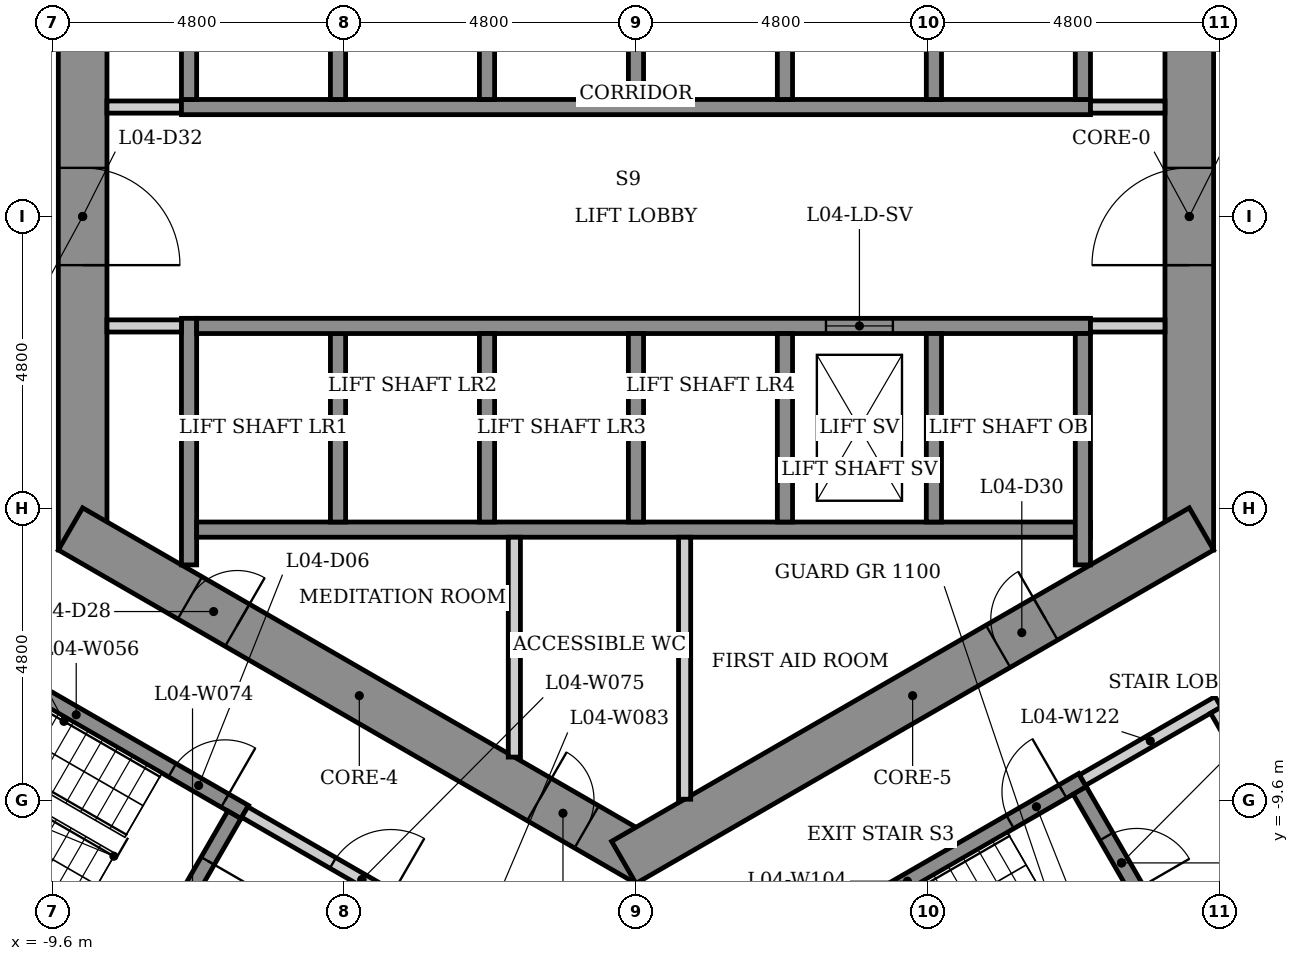
"""IFC4 building model, lengths in metres.
Left out: names, types, materials, properties, quantities, classifications, styles, units other than length and angle.
Written with IfcOpenShell. Run it as: python <this file> out.ifc"""

import sys

from ifc_helpers import new_model, si_unit, direction, frame, frame_2d, origin, place, context, subcontext, project, spatial, rectangle, extrude, element, fill, save


model = new_model("IFC4")
c1 = context("Model", 3, precision=1e-05, world=origin(), true_north=direction((0.0, 1.0)))
c2 = subcontext(c1, "Body", "Model", "MODEL_VIEW")
j1 = project(units=[si_unit("LENGTHUNIT", "METRE"), si_unit("PLANEANGLEUNIT", "RADIAN")], contexts=[c1])
p1 = place(None, origin())
s1 = spatial("IfcSite", under=j1, at=p1, CompositionType="ELEMENT")
p2 = place(p1, origin())
s2 = spatial("IfcBuilding", under=s1, at=p2, CompositionType="ELEMENT")
p3 = place(p2, frame((0.0, 0.0, 20.5)))
s3 = spatial("IfcBuildingStorey", under=s2, at=p3, CompositionType="ELEMENT", Elevation=20.5)
p4 = place(p3, frame((9.1, -5.485, 0.0), z_axis=(0.0, 0.0, 1.0), x_axis=(0.0, 1.0, 0.0)))
e1 = element("IfcWall", 1, at=p4, inside=s3, PredefinedType="SHEAR", context=c2, shape_type="SweptSolid", body=[
    extrude(rectangle(XDim=10.97, YDim=0.8, at=frame_2d((5.485, 0.0))), origin(), (0.0, 0.0, 1.0), 5.0),
])
p5 = place(p4, frame((4.685, 0.0, 0.0)))
e2 = element("IfcOpeningElement", 2, at=p5, cuts=e1, PredefinedType="OPENING", context=c2, shape_type="SweptSolid", body=[
    extrude(rectangle(XDim=1.6, YDim=2.1, at=frame_2d((0.8, 1.05))), frame((0.0, 0.41, 0.0), z_axis=(0.0, -1.0, 0.0), x_axis=(1.0, 0.0, 0.0)), (0.0, 0.0, 1.0), 0.82),
])
p6 = place(p3, frame((-9.1, 5.485, 0.0), z_axis=(0.0, 0.0, 1.0), x_axis=(0.0, -1.0, 0.0)))
e3 = element("IfcWall", 3, at=p6, inside=s3, PredefinedType="SHEAR", context=c2, shape_type="SweptSolid", body=[
    extrude(rectangle(XDim=10.97, YDim=0.8, at=frame_2d((5.485, 0.0))), origin(), (0.0, 0.0, 1.0), 5.0),
])
p7 = place(p6, frame((4.685, 0.0, 0.0)))
e4 = element("IfcOpeningElement", 4, at=p7, cuts=e3, PredefinedType="OPENING", context=c2, shape_type="SweptSolid", body=[
    extrude(rectangle(XDim=1.6, YDim=2.1, at=frame_2d((0.8, 1.05))), frame((0.0, 0.41, 0.0), z_axis=(0.0, -1.0, 0.0), x_axis=(1.0, 0.0, 0.0)), (0.0, 0.0, 1.0), 0.82),
])
p8 = place(p3, frame((-9.3, -5.138, 0.0), z_axis=(0.0, 0.0, 1.0), x_axis=(0.866023993627, -0.500002442456, 0.0)))
e5 = element("IfcWall", 5, at=p8, inside=s3, PredefinedType="SHEAR", context=c2, shape_type="SweptSolid", body=[
    extrude(rectangle(XDim=10.97, YDim=0.8, at=frame_2d((5.485, 0.0))), origin(), (0.0, 0.0, 1.0), 5.0),
])
p9 = place(p8, frame((2.268, 0.0, 0.0)))
e6 = element("IfcOpeningElement", 6, at=p9, cuts=e5, PredefinedType="OPENING", context=c2, shape_type="SweptSolid", body=[
    extrude(rectangle(XDim=0.9, YDim=2.1, at=frame_2d((0.45, 1.05))), frame((0.0, 0.41, 0.0), z_axis=(0.0, -1.0, 0.0), x_axis=(1.0, 0.0, 0.0)), (0.0, 0.0, 1.0), 0.82),
])
p10 = place(p8, frame((8.903, 0.0, 0.0)))
e7 = element("IfcOpeningElement", 7, at=p10, cuts=e5, PredefinedType="OPENING", context=c2, shape_type="SweptSolid", body=[
    extrude(rectangle(XDim=0.9, YDim=2.1, at=frame_2d((0.45, 1.05))), frame((0.0, 0.41, 0.0), z_axis=(0.0, -1.0, 0.0), x_axis=(1.0, 0.0, 0.0)), (0.0, 0.0, 1.0), 0.82),
])
p11 = place(p3, frame((-0.2, -10.623, 0.0), z_axis=(0.0, 0.0, 1.0), x_axis=(0.866023993627, 0.500002442456, 0.0)))
e8 = element("IfcWall", 8, at=p11, inside=s3, PredefinedType="SHEAR", context=c2, shape_type="SweptSolid", body=[
    extrude(rectangle(XDim=10.97, YDim=0.8, at=frame_2d((5.485, 0.0))), origin(), (0.0, 0.0, 1.0), 5.0),
])
p12 = place(p11, frame((7.108, 0.0, 0.0)))
e9 = element("IfcOpeningElement", 9, at=p12, cuts=e8, PredefinedType="OPENING", context=c2, shape_type="SweptSolid", body=[
    extrude(rectangle(XDim=0.9, YDim=2.1, at=frame_2d((0.45, 1.05))), frame((0.0, 0.41, 0.0), z_axis=(0.0, -1.0, 0.0), x_axis=(1.0, 0.0, 0.0)), (0.0, 0.0, 1.0), 0.82),
])
p13 = place(p3, frame((-11.977, -6.595, 0.0), z_axis=(0.0, 0.0, 1.0), x_axis=(0.866025499775, -0.499999833739, 0.0)))
e10 = element("IfcWall", 10, at=p13, inside=s3, PredefinedType="SHEAR", context=c2, shape_type="SweptSolid", body=[
    extrude(rectangle(XDim=6.4, YDim=0.25, at=frame_2d((3.2, 0.0))), origin(), (0.0, 0.0, 1.0), 4.65),
])
p14 = place(p13, frame((5.025, 0.0, 0.0)))
e11 = element("IfcOpeningElement", 11, at=p14, cuts=e10, PredefinedType="OPENING", context=c2, shape_type="SweptSolid", body=[
    extrude(rectangle(XDim=1.0, YDim=2.1, at=frame_2d((0.5, 1.05))), frame((0.0, 0.135, 0.0), z_axis=(0.0, -1.0, 0.0), x_axis=(1.0, 0.0, 0.0)), (0.0, 0.0, 1.0), 0.27),
])
p15 = place(p3, frame((-8.7, 1.8, 0.0), z_axis=(0.0, 0.0, 1.0), x_axis=(1.0, 0.0, 0.0)))
e12 = element("IfcWall", 12, at=p15, inside=s3, PredefinedType="PARTITIONING", context=c2, shape_type="SweptSolid", body=[
    extrude(rectangle(XDim=1.225, YDim=0.2, at=frame_2d((0.613, 0.0))), origin(), (0.0, 0.0, 1.0), 4.65),
])
p16 = place(p3, frame((-7.935, -12.393, 0.0), z_axis=(0.0, 0.0, 1.0), x_axis=(-0.866025499775, 0.499999833739, 0.0)))
e13 = element("IfcWall", 13, at=p16, inside=s3, PredefinedType="SHEAR", context=c2, shape_type="SweptSolid", body=[
    extrude(rectangle(XDim=6.4, YDim=0.25, at=frame_2d((3.2, 0.0))), origin(), (0.0, 0.0, 1.0), 4.65),
])
p17 = place(p3, frame((-7.475, 1.8, 0.0), z_axis=(0.0, 0.0, 1.0), x_axis=(1.0, 0.0, 0.0)))
e14 = element("IfcWall", 14, at=p17, inside=s3, PredefinedType="SHEAR", context=c2, shape_type="SweptSolid", body=[
    extrude(rectangle(XDim=14.95, YDim=0.25, at=frame_2d((7.475, 0.0))), origin(), (0.0, 0.0, 1.0), 4.65),
])
p18 = place(p3, frame((-7.35, -5.73, 0.0), z_axis=(0.0, 0.0, 1.0), x_axis=(0.0, 1.0, 0.0)))
e15 = element("IfcWall", 15, at=p18, inside=s3, PredefinedType="SHEAR", context=c2, shape_type="SweptSolid", body=[
    extrude(rectangle(XDim=4.055, YDim=0.25, at=frame_2d((2.028, 0.0))), origin(), (0.0, 0.0, 1.0), 4.65),
])
p19 = place(p3, frame((-7.35, 1.925, 0.0), z_axis=(0.0, 0.0, 1.0), x_axis=(0.0, 1.0, 0.0)))
e16 = element("IfcWall", 16, at=p19, inside=s3, PredefinedType="SHEAR", context=c2, shape_type="SweptSolid", body=[
    extrude(rectangle(XDim=3.805, YDim=0.25, at=frame_2d((1.903, 0.0))), origin(), (0.0, 0.0, 1.0), 4.65),
])
p20 = place(p3, frame((-7.475, -1.8, 0.0), z_axis=(0.0, 0.0, 1.0), x_axis=(-1.0, 0.0, 0.0)))
e17 = element("IfcWall", 17, at=p20, inside=s3, PredefinedType="PARTITIONING", context=c2, shape_type="SweptSolid", body=[
    extrude(rectangle(XDim=1.225, YDim=0.2, at=frame_2d((0.613, 0.0))), origin(), (0.0, 0.0, 1.0), 4.65),
])
p21 = place(p3, frame((-6.605, -9.841, 0.0), z_axis=(0.0, 0.0, 1.0), x_axis=(-0.499996545922, -0.866027397988, 0.0)))
e18 = element("IfcWall", 18, at=p21, inside=s3, PredefinedType="SHEAR", context=c2, shape_type="SweptSolid", body=[
    extrude(rectangle(XDim=2.75, YDim=0.25, at=frame_2d((1.375, 0.0))), origin(), (0.0, 0.0, 1.0), 4.65),
])
p22 = place(p21, frame((0.875, 0.0, 0.0)))
e19 = element("IfcOpeningElement", 19, at=p22, cuts=e18, PredefinedType="OPENING", context=c2, shape_type="SweptSolid", body=[
    extrude(rectangle(XDim=1.0, YDim=2.1, at=frame_2d((0.5, 1.05))), frame((0.0, 0.135, 0.0), z_axis=(0.0, -1.0, 0.0), x_axis=(1.0, 0.0, 0.0)), (0.0, 0.0, 1.0), 0.27),
])
p23 = place(p3, frame((-6.435, -9.795, 0.0), z_axis=(0.0, 0.0, 1.0), x_axis=(0.866012907634, -0.500021643343, 0.0)))
e20 = element("IfcWall", 20, at=p23, inside=s3, PredefinedType="PARTITIONING", context=c2, shape_type="SweptSolid", body=[
    extrude(rectangle(XDim=4.45, YDim=0.2, at=frame_2d((2.225, 0.0))), origin(), (0.0, 0.0, 1.0), 4.65),
])
p24 = place(p23, frame((1.675, 0.0, 0.0)))
e21 = element("IfcOpeningElement", 21, at=p24, cuts=e20, PredefinedType="OPENING", context=c2, shape_type="SweptSolid", body=[
    extrude(rectangle(XDim=1.1, YDim=2.1, at=frame_2d((0.55, 1.05))), frame((0.0, 0.11, 0.0), z_axis=(0.0, -1.0, 0.0), x_axis=(1.0, 0.0, 0.0)), (0.0, 0.0, 1.0), 0.22),
])
p25 = place(p3, frame((-7.225, -5.15, 0.0), z_axis=(0.0, 0.0, 1.0), x_axis=(1.0, 0.0, 0.0)))
e22 = element("IfcWall", 22, at=p25, inside=s3, PredefinedType="SHEAR", context=c2, shape_type="SweptSolid", body=[
    extrude(rectangle(XDim=14.7, YDim=0.25, at=frame_2d((7.35, 0.0))), origin(), (0.0, 0.0, 1.0), 4.65),
])
for number, where, z_axis, x_axis in (
    (23, (-4.9, -1.925, 0.0), (0.0, 0.0, 1.0), (0.0, -1.0, 0.0)),
    (24, (-4.9, 5.025, 0.0), (0.0, 0.0, 1.0), (0.0, -1.0, 0.0)),
):
    element("IfcWall", number, at=place(p3, frame(where, z_axis=z_axis, x_axis=x_axis)), inside=s3, PredefinedType="SHEAR", context=c2, shape_type="SweptSolid", body=[
        extrude(rectangle(XDim=3.1, YDim=0.25, at=frame_2d((1.55, 0.0))), origin(), (0.0, 0.0, 1.0), 5.0),
    ])
p26 = place(p3, frame((-7.225, -1.8, 0.0), z_axis=(0.0, 0.0, 1.0), x_axis=(1.0, 0.0, 0.0)))
e25 = element("IfcWall", 25, at=p26, inside=s3, PredefinedType="SHEAR", context=c2, shape_type="SweptSolid", body=[
    extrude(rectangle(XDim=14.7, YDim=0.25, at=frame_2d((7.35, 0.0))), origin(), (0.0, 0.0, 1.0), 4.65),
])
p27 = place(p26, frame((10.35, 0.0, 0.0)))
e26 = element("IfcOpeningElement", 26, at=p27, cuts=e25, PredefinedType="OPENING", context=c2, shape_type="SweptSolid", body=[
    extrude(rectangle(XDim=1.1, YDim=2.1, at=frame_2d((0.55, 1.05))), frame((0.0, 0.135, 0.0), z_axis=(0.0, -1.0, 0.0), x_axis=(1.0, 0.0, 0.0)), (0.0, 0.0, 1.0), 0.27),
])
for number, where, z_axis, x_axis in (
    (27, (-2.45, -1.925, 0.0), (0.0, 0.0, 1.0), (0.0, -1.0, 0.0)),
    (28, (-2.45, 5.025, 0.0), (0.0, 0.0, 1.0), (0.0, -1.0, 0.0)),
):
    element("IfcWall", number, at=place(p3, frame(where, z_axis=z_axis, x_axis=x_axis)), inside=s3, PredefinedType="SHEAR", context=c2, shape_type="SweptSolid", body=[
        extrude(rectangle(XDim=3.1, YDim=0.25, at=frame_2d((1.55, 0.0))), origin(), (0.0, 0.0, 1.0), 5.0),
    ])
p28 = place(p3, frame((-2.0, -5.275, 0.0), z_axis=(0.0, 0.0, 1.0), x_axis=(0.0, -1.0, 0.0)))
e29 = element("IfcWall", 29, at=p28, inside=s3, PredefinedType="PARTITIONING", context=c2, shape_type="SweptSolid", body=[
    extrude(rectangle(XDim=3.616, YDim=0.2, at=frame_2d((1.808, 0.0))), origin(), (0.0, 0.0, 1.0), 4.65),
])
for number, where, z_axis, x_axis in (
    (30, (0.0, -1.925, 0.0), (0.0, 0.0, 1.0), (0.0, -1.0, 0.0)),
    (31, (0.0, 5.025, 0.0), (0.0, 0.0, 1.0), (0.0, -1.0, 0.0)),
):
    element("IfcWall", number, at=place(p3, frame(where, z_axis=z_axis, x_axis=x_axis)), inside=s3, PredefinedType="SHEAR", context=c2, shape_type="SweptSolid", body=[
        extrude(rectangle(XDim=3.1, YDim=0.25, at=frame_2d((1.55, 0.0))), origin(), (0.0, 0.0, 1.0), 5.0),
    ])
p29 = place(p3, frame((0.8, -5.275, 0.0), z_axis=(0.0, 0.0, 1.0), x_axis=(0.0, -1.0, 0.0)))
e32 = element("IfcWall", 32, at=p29, inside=s3, PredefinedType="PARTITIONING", context=c2, shape_type="SweptSolid", body=[
    extrude(rectangle(XDim=4.309, YDim=0.2, at=frame_2d((2.155, 0.0))), origin(), (0.0, 0.0, 1.0), 4.65),
])
p30 = place(p3, frame((1.585, -12.595, 0.0), z_axis=(0.0, 0.0, 1.0), x_axis=(0.866036417653, 0.499980922934, 0.0)))
e33 = element("IfcWall", 33, at=p30, inside=s3, PredefinedType="SHEAR", context=c2, shape_type="SweptSolid", body=[
    extrude(rectangle(XDim=6.65, YDim=0.25, at=frame_2d((3.325, 0.0))), origin(), (0.0, 0.0, 1.0), 4.65),
])
p31 = place(p30, frame((5.275, 0.0, 0.0)))
e34 = element("IfcOpeningElement", 34, at=p31, cuts=e33, PredefinedType="OPENING", context=c2, shape_type="SweptSolid", body=[
    extrude(rectangle(XDim=1.0, YDim=2.1, at=frame_2d((0.5, 1.05))), frame((0.0, 0.135, 0.0), z_axis=(0.0, -1.0, 0.0), x_axis=(1.0, 0.0, 0.0)), (0.0, 0.0, 1.0), 0.27),
])
for number, where, z_axis, x_axis in (
    (35, (2.45, -1.925, 0.0), (0.0, 0.0, 1.0), (0.0, -1.0, 0.0)),
    (36, (2.45, 5.025, 0.0), (0.0, 0.0, 1.0), (0.0, -1.0, 0.0)),
    (37, (4.9, -1.925, 0.0), (0.0, 0.0, 1.0), (0.0, -1.0, 0.0)),
    (38, (4.9, 5.025, 0.0), (0.0, 0.0, 1.0), (0.0, -1.0, 0.0)),
):
    element("IfcWall", number, at=place(p3, frame(where, z_axis=z_axis, x_axis=x_axis)), inside=s3, PredefinedType="SHEAR", context=c2, shape_type="SweptSolid", body=[
        extrude(rectangle(XDim=3.1, YDim=0.25, at=frame_2d((1.55, 0.0))), origin(), (0.0, 0.0, 1.0), 5.0),
    ])
p32 = place(p3, frame((7.298, -9.441, 0.0), z_axis=(0.0, 0.0, 1.0), x_axis=(0.500034990121, -0.866005201286, 0.0)))
e39 = element("IfcWall", 39, at=p32, inside=s3, PredefinedType="SHEAR", context=c2, shape_type="SweptSolid", body=[
    extrude(rectangle(XDim=2.75, YDim=0.25, at=frame_2d((1.375, 0.0))), origin(), (0.0, 0.0, 1.0), 4.65),
])
p33 = place(p32, frame((0.875, 0.0, 0.0)))
e40 = element("IfcOpeningElement", 40, at=p33, cuts=e39, PredefinedType="OPENING", context=c2, shape_type="SweptSolid", body=[
    extrude(rectangle(XDim=1.0, YDim=2.1, at=frame_2d((0.5, 1.05))), frame((0.0, 0.135, 0.0), z_axis=(0.0, -1.0, 0.0), x_axis=(1.0, 0.0, 0.0)), (0.0, 0.0, 1.0), 0.27),
])
p34 = place(p3, frame((7.344, -9.27, 0.0), z_axis=(0.0, 0.0, 1.0), x_axis=(0.866005588531, 0.500034319456, 0.0)))
e41 = element("IfcWall", 41, at=p34, inside=s3, PredefinedType="PARTITIONING", context=c2, shape_type="SweptSolid", body=[
    extrude(rectangle(XDim=2.575, YDim=0.2, at=frame_2d((1.288, 0.0))), origin(), (0.0, 0.0, 1.0), 4.65),
])
p35 = place(p3, frame((7.475, 1.8, 0.0), z_axis=(0.0, 0.0, 1.0), x_axis=(1.0, 0.0, 0.0)))
e42 = element("IfcWall", 42, at=p35, inside=s3, PredefinedType="PARTITIONING", context=c2, shape_type="SweptSolid", body=[
    extrude(rectangle(XDim=1.225, YDim=0.2, at=frame_2d((0.613, 0.0))), origin(), (0.0, 0.0, 1.0), 4.65),
])
for number, where, z_axis, x_axis in (
    (43, (7.35, -1.925, 0.0), (0.0, 0.0, 1.0), (0.0, -1.0, 0.0)),
    (44, (7.35, 5.73, 0.0), (0.0, 0.0, 1.0), (0.0, -1.0, 0.0)),
):
    element("IfcWall", number, at=place(p3, frame(where, z_axis=z_axis, x_axis=x_axis)), inside=s3, PredefinedType="SHEAR", context=c2, shape_type="SweptSolid", body=[
        extrude(rectangle(XDim=3.805, YDim=0.25, at=frame_2d((1.903, 0.0))), origin(), (0.0, 0.0, 1.0), 4.65),
    ])
p36 = place(p3, frame((8.7, -1.8, 0.0), z_axis=(0.0, 0.0, 1.0), x_axis=(-1.0, 0.0, 0.0)))
e45 = element("IfcWall", 45, at=p36, inside=s3, PredefinedType="PARTITIONING", context=c2, shape_type="SweptSolid", body=[
    extrude(rectangle(XDim=1.225, YDim=0.2, at=frame_2d((0.613, 0.0))), origin(), (0.0, 0.0, 1.0), 4.65),
])
p37 = place(p3, frame((9.537, -8.119, 0.0), z_axis=(0.0, 0.0, 1.0), x_axis=(0.499990139034, -0.866031096941, 0.0)))
e46 = element("IfcWall", 46, at=p37, inside=s3, PredefinedType="PARTITIONING", context=c2, shape_type="SweptSolid", body=[
    extrude(rectangle(XDim=3.0, YDim=0.2, at=frame_2d((1.5, 0.0))), origin(), (0.0, 0.0, 1.0), 4.65),
])
p38 = place(p37, frame((0.935, 0.0, 0.0)))
e47 = element("IfcOpeningElement", 47, at=p38, cuts=e46, PredefinedType="OPENING", context=c2, shape_type="SweptSolid", body=[
    extrude(rectangle(XDim=1.0, YDim=2.1, at=frame_2d((0.5, 1.05))), frame((0.0, 0.11, 0.0), z_axis=(0.0, -1.0, 0.0), x_axis=(1.0, 0.0, 0.0)), (0.0, 0.0, 1.0), 0.22),
])
p39 = place(p3, frame((10.901, -10.681, 0.0), z_axis=(0.0, 0.0, 1.0), x_axis=(-0.866007538022, -0.500030943131, 0.0)))
e48 = element("IfcWall", 48, at=p39, inside=s3, PredefinedType="PLUMBINGWALL", context=c2, shape_type="SweptSolid", body=[
    extrude(rectangle(XDim=2.375, YDim=0.2, at=frame_2d((1.188, 0.0))), origin(), (0.0, 0.0, 1.0), 4.65),
])
p40 = place(p27, origin())
e49 = element("IfcDoor", 49, at=p40, inside=s3, OperationType="SLIDING_TO_LEFT", PredefinedType="DOOR", context=c2, shape_type="SweptSolid", body=[
    extrude(rectangle(XDim=1.1, YDim=2.1, at=frame_2d((0.55, 1.05))), frame((0.0, 0.025, 0.0), z_axis=(0.0, -1.0, 0.0), x_axis=(1.0, 0.0, 0.0)), (0.0, 0.0, 1.0), 0.05),
])
fill(e26, e49)
p41 = place(p14, origin())
e50 = element("IfcDoor", 50, at=p41, inside=s3, OperationType="SINGLE_SWING_RIGHT", PredefinedType="DOOR", context=c2, shape_type="SweptSolid", body=[
    extrude(rectangle(XDim=1.0, YDim=2.1, at=frame_2d((0.5, 1.05))), frame((0.0, 0.025, 0.0), z_axis=(0.0, -1.0, 0.0), x_axis=(1.0, 0.0, 0.0)), (0.0, 0.0, 1.0), 0.05),
])
fill(e11, e50)
p42 = place(p22, origin())
e51 = element("IfcDoor", 51, at=p42, inside=s3, OperationType="SINGLE_SWING_LEFT", PredefinedType="DOOR", context=c2, shape_type="SweptSolid", body=[
    extrude(rectangle(XDim=1.0, YDim=2.1, at=frame_2d((0.5, 1.05))), frame((0.0, 0.025, 0.0), z_axis=(0.0, -1.0, 0.0), x_axis=(1.0, 0.0, 0.0)), (0.0, 0.0, 1.0), 0.05),
])
fill(e19, e51)
p43 = place(p24, origin())
e52 = element("IfcDoor", 52, at=p43, inside=s3, OperationType="SINGLE_SWING_RIGHT", PredefinedType="DOOR", context=c2, shape_type="SweptSolid", body=[
    extrude(rectangle(XDim=1.1, YDim=2.1, at=frame_2d((0.55, 1.05))), frame((0.0, 0.025, 0.0), z_axis=(0.0, -1.0, 0.0), x_axis=(1.0, 0.0, 0.0)), (0.0, 0.0, 1.0), 0.05),
])
fill(e21, e52)
p44 = place(p31, origin())
e53 = element("IfcDoor", 53, at=p44, inside=s3, OperationType="SINGLE_SWING_RIGHT", PredefinedType="DOOR", context=c2, shape_type="SweptSolid", body=[
    extrude(rectangle(XDim=1.0, YDim=2.1, at=frame_2d((0.5, 1.05))), frame((0.0, 0.025, 0.0), z_axis=(0.0, -1.0, 0.0), x_axis=(1.0, 0.0, 0.0)), (0.0, 0.0, 1.0), 0.05),
])
fill(e34, e53)
p45 = place(p33, origin())
e54 = element("IfcDoor", 54, at=p45, inside=s3, OperationType="SINGLE_SWING_RIGHT", PredefinedType="DOOR", context=c2, shape_type="SweptSolid", body=[
    extrude(rectangle(XDim=1.0, YDim=2.1, at=frame_2d((0.5, 1.05))), frame((0.0, 0.025, 0.0), z_axis=(0.0, -1.0, 0.0), x_axis=(1.0, 0.0, 0.0)), (0.0, 0.0, 1.0), 0.05),
])
fill(e40, e54)
p46 = place(p9, origin())
e55 = element("IfcDoor", 55, at=p46, inside=s3, OperationType="SINGLE_SWING_RIGHT", PredefinedType="DOOR", context=c2, shape_type="SweptSolid", body=[
    extrude(rectangle(XDim=0.9, YDim=2.1, at=frame_2d((0.45, 1.05))), frame((0.0, 0.025, 0.0), z_axis=(0.0, -1.0, 0.0), x_axis=(1.0, 0.0, 0.0)), (0.0, 0.0, 1.0), 0.05),
])
fill(e6, e55)
p47 = place(p10, origin())
e56 = element("IfcDoor", 56, at=p47, inside=s3, OperationType="SINGLE_SWING_LEFT", PredefinedType="DOOR", context=c2, shape_type="SweptSolid", body=[
    extrude(rectangle(XDim=0.9, YDim=2.1, at=frame_2d((0.45, 1.05))), frame((0.0, 0.025, 0.0), z_axis=(0.0, -1.0, 0.0), x_axis=(1.0, 0.0, 0.0)), (0.0, 0.0, 1.0), 0.05),
])
fill(e7, e56)
p48 = place(p12, origin())
e57 = element("IfcDoor", 57, at=p48, inside=s3, OperationType="SINGLE_SWING_RIGHT", PredefinedType="DOOR", context=c2, shape_type="SweptSolid", body=[
    extrude(rectangle(XDim=0.9, YDim=2.1, at=frame_2d((0.45, 1.05))), frame((0.0, 0.025, 0.0), z_axis=(0.0, -1.0, 0.0), x_axis=(1.0, 0.0, 0.0)), (0.0, 0.0, 1.0), 0.05),
])
fill(e9, e57)
p49 = place(p5, origin())
e58 = element("IfcDoor", 58, at=p49, inside=s3, OperationType="SINGLE_SWING_LEFT", PredefinedType="DOOR", context=c2, shape_type="SweptSolid", body=[
    extrude(rectangle(XDim=1.6, YDim=2.1, at=frame_2d((0.8, 1.05))), frame((0.0, 0.025, 0.0), z_axis=(0.0, -1.0, 0.0), x_axis=(1.0, 0.0, 0.0)), (0.0, 0.0, 1.0), 0.05),
])
fill(e2, e58)
p50 = place(p7, origin())
e59 = element("IfcDoor", 59, at=p50, inside=s3, OperationType="SINGLE_SWING_RIGHT", PredefinedType="DOOR", context=c2, shape_type="SweptSolid", body=[
    extrude(rectangle(XDim=1.6, YDim=2.1, at=frame_2d((0.8, 1.05))), frame((0.0, 0.025, 0.0), z_axis=(0.0, -1.0, 0.0), x_axis=(1.0, 0.0, 0.0)), (0.0, 0.0, 1.0), 0.05),
])
fill(e4, e59)
save(model, sys.argv[1])
